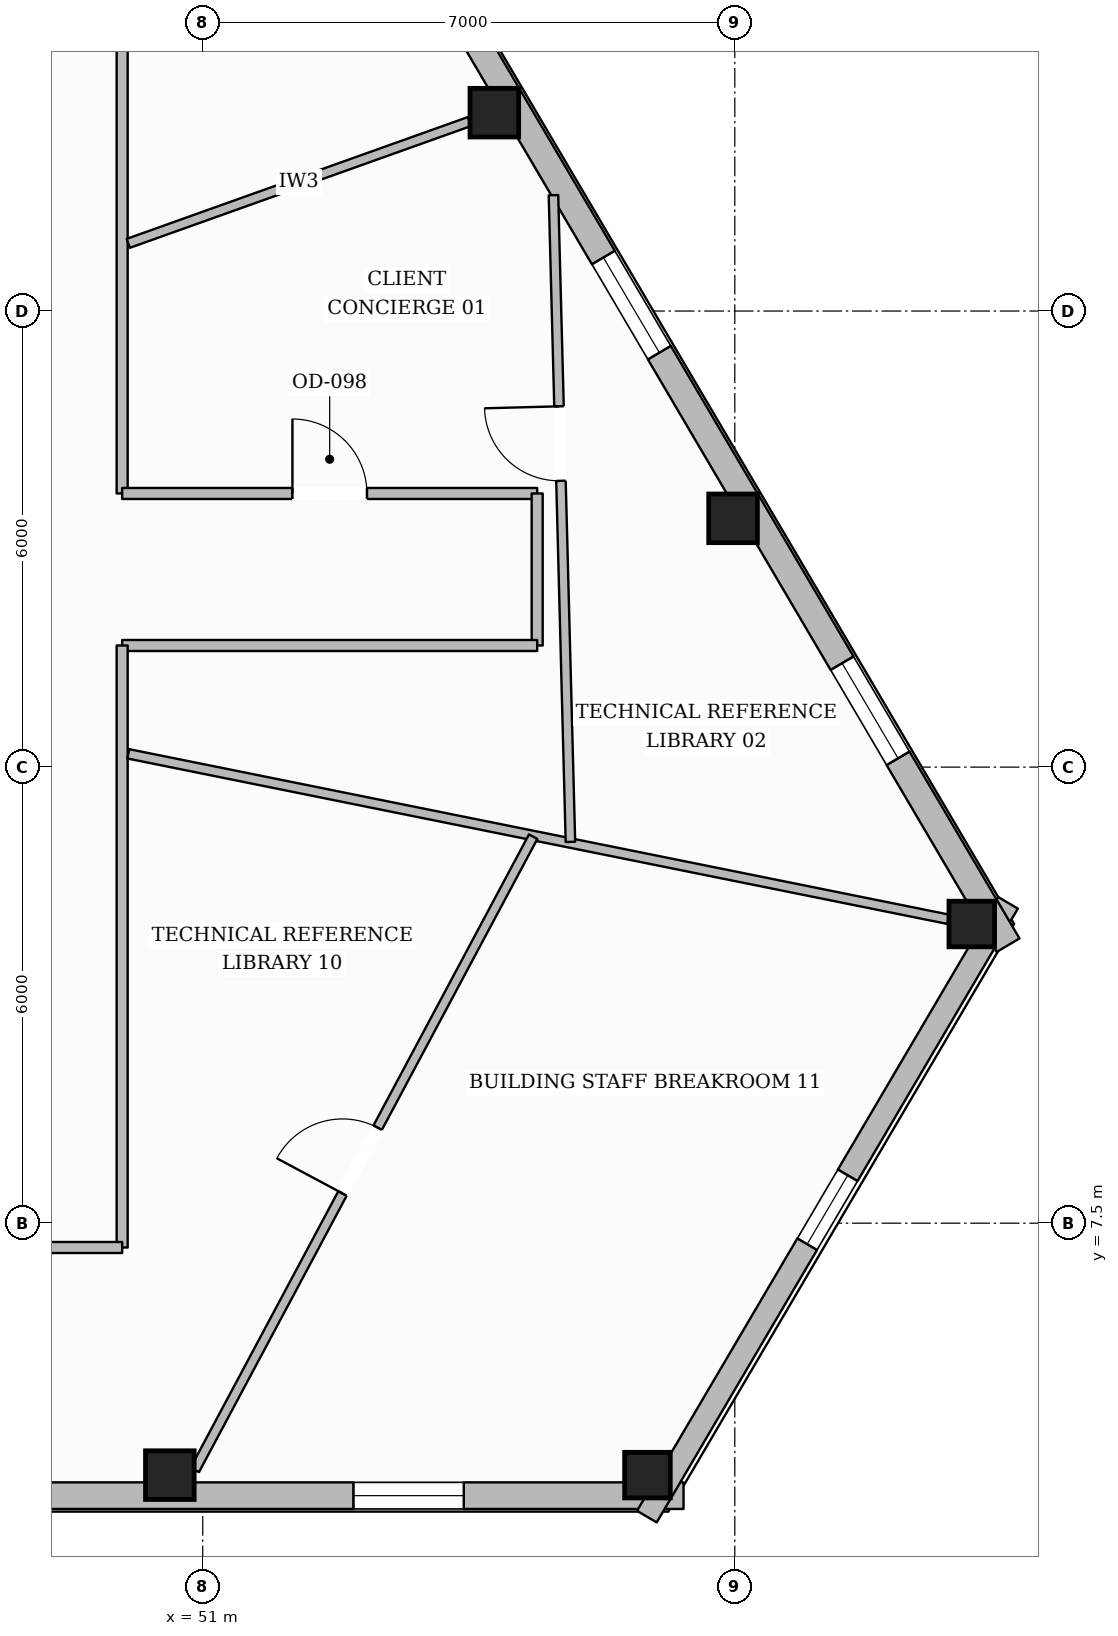
"""IFC4 building model, lengths in metres.
Left out: names, types, materials, properties, quantities, classifications, styles, units other than length and angle.
Written with IfcOpenShell. Run it as: python <this file> out.ifc"""

import sys

from ifc_helpers import new_model, si_unit, direction, frame, frame_2d, origin, origin_2d, place, context, subcontext, project, spatial, rectangle, hollow_rectangle, extrude, element, fill, save


model = new_model("IFC4")
c1 = context("Model", 3, precision=1e-05, world=origin(), true_north=direction((0.0, 1.0)))
c2 = subcontext(c1, "Body", "Model", "MODEL_VIEW")
j1 = project(units=[si_unit("LENGTHUNIT", "METRE"), si_unit("PLANEANGLEUNIT", "RADIAN")], contexts=[c1])
p1 = place(None, origin())
s1 = spatial("IfcSite", under=j1, at=p1, CompositionType="ELEMENT")
p2 = place(p1, origin())
s2 = spatial("IfcBuilding", under=s1, at=p2, CompositionType="ELEMENT")
p3 = place(p2, frame((0.0, 0.0, 203.5)))
s3 = spatial("IfcBuildingStorey", under=s2, at=p3, CompositionType="ELEMENT", Elevation=203.5)
p4 = place(p3, frame((50.567, 4.185, 0.0), z_axis=(0.0, 0.0, 1.0), x_axis=(1.0, 0.0, 0.0)))
e1 = element("IfcColumn", 1, at=p4, inside=s3, PredefinedType="COLUMN", context=c2, shape_type="SweptSolid", body=[
    extrude(hollow_rectangle(XDim=0.64, YDim=0.64, WallThickness=0.028, at=origin_2d()), origin(), (0.0, 0.0, 1.0), 3.6),
])
for number, where, z_axis, x_axis in (
    (2, (56.851, 4.185, 0.0), (0.0, 0.0, 1.0), (1.0, 0.0, 0.0)),
    (3, (61.117, 11.436, 0.0), (0.0, 0.0, 1.0), (1.0, 0.0, 0.0)),
):
    element("IfcColumn", number, at=place(p3, frame(where, z_axis=z_axis, x_axis=x_axis)), inside=s3, PredefinedType="COLUMN", context=c2, shape_type="SweptSolid", body=[
        extrude(hollow_rectangle(XDim=0.6, YDim=0.6, WallThickness=0.028, at=origin_2d()), origin(), (0.0, 0.0, 1.0), 3.6),
    ])
for number, where, z_axis, x_axis in (
    (4, (57.977, 16.773, 0.0), (0.0, 0.0, 1.0), (1.0, 0.0, 0.0)),
    (5, (54.836, 22.11, 0.0), (0.0, 0.0, 1.0), (1.0, 0.0, 0.0)),
):
    element("IfcColumn", number, at=place(p3, frame(where, z_axis=z_axis, x_axis=x_axis)), inside=s3, PredefinedType="COLUMN", context=c2, shape_type="SweptSolid", body=[
        extrude(hollow_rectangle(XDim=0.64, YDim=0.64, WallThickness=0.028, at=origin_2d()), origin(), (0.0, 0.0, 1.0), 3.6),
    ])
p5 = place(p3, frame((57.325, 3.915, 0.0), z_axis=(0.0, 0.0, 1.0), x_axis=(-1.0, 0.0, 0.0)))
e6 = element("IfcWall", 6, at=p5, inside=s3, PredefinedType="STANDARD", context=c2, shape_type="SweptSolid", body=[
    extrude(rectangle(XDim=38.651, YDim=0.35, at=frame_2d((19.325, 0.0))), origin(), (0.0, 0.0, 1.0), 3.132),
])
p6 = place(p5, frame((34.31, 0.0, 0.65)))
e7 = element("IfcOpeningElement", 7, at=p6, cuts=e6, PredefinedType="OPENING", context=c2, shape_type="SweptSolid", body=[
    extrude(rectangle(XDim=1.45, YDim=1.75, at=frame_2d((0.725, 0.875))), frame((0.0, 0.185, 0.0), z_axis=(0.0, -1.0, 0.0), x_axis=(1.0, 0.0, 0.0)), (0.0, 0.0, 1.0), 0.37),
])
p7 = place(p5, frame((28.026, 0.0, 0.65)))
e8 = element("IfcOpeningElement", 8, at=p7, cuts=e6, PredefinedType="OPENING", context=c2, shape_type="SweptSolid", body=[
    extrude(rectangle(XDim=1.45, YDim=1.75, at=frame_2d((0.725, 0.875))), frame((0.0, 0.185, 0.0), z_axis=(0.0, -1.0, 0.0), x_axis=(1.0, 0.0, 0.0)), (0.0, 0.0, 1.0), 0.37),
])
p8 = place(p5, frame((15.458, 0.0, 0.65)))
e9 = element("IfcOpeningElement", 9, at=p8, cuts=e6, PredefinedType="OPENING", context=c2, shape_type="SweptSolid", body=[
    extrude(rectangle(XDim=1.45, YDim=1.75, at=frame_2d((0.725, 0.875))), frame((0.0, 0.185, 0.0), z_axis=(0.0, -1.0, 0.0), x_axis=(1.0, 0.0, 0.0)), (0.0, 0.0, 1.0), 0.37),
])
p9 = place(p5, frame((9.175, 0.0, 0.65)))
e10 = element("IfcOpeningElement", 10, at=p9, cuts=e6, PredefinedType="OPENING", context=c2, shape_type="SweptSolid", body=[
    extrude(rectangle(XDim=1.45, YDim=1.75, at=frame_2d((0.725, 0.875))), frame((0.0, 0.185, 0.0), z_axis=(0.0, -1.0, 0.0), x_axis=(1.0, 0.0, 0.0)), (0.0, 0.0, 1.0), 0.37),
])
p10 = place(p5, frame((2.891, 0.0, 0.65)))
e11 = element("IfcOpeningElement", 11, at=p10, cuts=e6, PredefinedType="OPENING", context=c2, shape_type="SweptSolid", body=[
    extrude(rectangle(XDim=1.45, YDim=1.75, at=frame_2d((0.725, 0.875))), frame((0.0, 0.185, 0.0), z_axis=(0.0, -1.0, 0.0), x_axis=(1.0, 0.0, 0.0)), (0.0, 0.0, 1.0), 0.37),
])
p11 = place(p3, frame((61.595, 11.715, 0.0), z_axis=(0.0, 0.0, 1.0), x_axis=(-0.507146520789, -0.861859853138, 0.0)))
e12 = element("IfcWall", 12, at=p11, inside=s3, PredefinedType="STANDARD", context=c2, shape_type="SweptSolid", body=[
    extrude(rectangle(XDim=9.369, YDim=0.3, at=frame_2d((4.685, 0.0))), origin(), (0.0, 0.0, 1.0), 3.132),
])
p12 = place(p11, frame((4.16, 0.0, 0.65)))
e13 = element("IfcOpeningElement", 13, at=p12, cuts=e12, PredefinedType="OPENING", context=c2, shape_type="SweptSolid", body=[
    extrude(rectangle(XDim=1.05, YDim=1.7, at=frame_2d((0.525, 0.85))), frame((0.0, 0.16, 0.0), z_axis=(0.0, -1.0, 0.0), x_axis=(1.0, 0.0, 0.0)), (0.0, 0.0, 1.0), 0.32),
])
p13 = place(p3, frame((42.267, 44.004, 0.0), z_axis=(0.0, 0.0, 1.0), x_axis=(0.507147779291, -0.861859112593, 0.0)))
e14 = element("IfcWall", 14, at=p13, inside=s3, PredefinedType="STANDARD", context=c2, shape_type="SweptSolid", body=[
    extrude(rectangle(XDim=38.111, YDim=0.35, at=frame_2d((19.056, 0.0))), origin(), (0.0, 0.0, 1.0), 3.132),
])
p14 = place(p13, frame((33.808, 0.0, 0.65)))
e15 = element("IfcOpeningElement", 15, at=p14, cuts=e14, PredefinedType="OPENING", context=c2, shape_type="SweptSolid", body=[
    extrude(rectangle(XDim=1.45, YDim=1.75, at=frame_2d((0.725, 0.875))), frame((0.0, 0.185, 0.0), z_axis=(0.0, -1.0, 0.0), x_axis=(1.0, 0.0, 0.0)), (0.0, 0.0, 1.0), 0.37),
])
p15 = place(p13, frame((27.615, 0.0, 0.65)))
e16 = element("IfcOpeningElement", 16, at=p15, cuts=e14, PredefinedType="OPENING", context=c2, shape_type="SweptSolid", body=[
    extrude(rectangle(XDim=1.45, YDim=1.75, at=frame_2d((0.725, 0.875))), frame((0.0, 0.185, 0.0), z_axis=(0.0, -1.0, 0.0), x_axis=(1.0, 0.0, 0.0)), (0.0, 0.0, 1.0), 0.37),
])
p16 = place(p13, frame((15.231, 0.0, 0.65)))
e17 = element("IfcOpeningElement", 17, at=p16, cuts=e14, PredefinedType="OPENING", context=c2, shape_type="SweptSolid", body=[
    extrude(rectangle(XDim=1.45, YDim=1.75, at=frame_2d((0.725, 0.875))), frame((0.0, 0.185, 0.0), z_axis=(0.0, -1.0, 0.0), x_axis=(1.0, 0.0, 0.0)), (0.0, 0.0, 1.0), 0.37),
])
p17 = place(p13, frame((9.038, 0.0, 0.65)))
e18 = element("IfcOpeningElement", 18, at=p17, cuts=e14, PredefinedType="OPENING", context=c2, shape_type="SweptSolid", body=[
    extrude(rectangle(XDim=1.45, YDim=1.75, at=frame_2d((0.725, 0.875))), frame((0.0, 0.185, 0.0), z_axis=(0.0, -1.0, 0.0), x_axis=(1.0, 0.0, 0.0)), (0.0, 0.0, 1.0), 0.37),
])
p18 = place(p13, frame((2.846, 0.0, 0.65)))
e19 = element("IfcOpeningElement", 19, at=p18, cuts=e14, PredefinedType="OPENING", context=c2, shape_type="SweptSolid", body=[
    extrude(rectangle(XDim=1.45, YDim=1.75, at=frame_2d((0.725, 0.875))), frame((0.0, 0.185, 0.0), z_axis=(0.0, -1.0, 0.0), x_axis=(1.0, 0.0, 0.0)), (0.0, 0.0, 1.0), 0.37),
])
p19 = place(p3, frame((49.94, 25.02, 0.0), z_axis=(0.0, 0.0, 1.0), x_axis=(0.0, -1.0, 0.0)))
e20 = element("IfcWall", 20, at=p19, inside=s3, PredefinedType="PARTITIONING", context=c2, shape_type="SweptSolid", body=[
    extrude(rectangle(XDim=7.92, YDim=0.145, at=frame_2d((3.96, 0.0))), origin(), (0.0, 0.0, 1.0), 3.339),
])
p20 = place(p3, frame((49.94, 17.1, 0.0), z_axis=(0.0, 0.0, 1.0), x_axis=(1.0, 0.0, 0.0)))
e21 = element("IfcWall", 21, at=p20, inside=s3, PredefinedType="PARTITIONING", context=c2, shape_type="SweptSolid", body=[
    extrude(rectangle(XDim=5.46, YDim=0.145, at=frame_2d((2.73, 0.0))), origin(), (0.0, 0.0, 1.0), 3.6),
])
p21 = place(p20, frame((2.24, 0.0, 0.0)))
e22 = element("IfcOpeningElement", 22, at=p21, cuts=e21, PredefinedType="OPENING", context=c2, shape_type="SweptSolid", body=[
    extrude(rectangle(XDim=0.98, YDim=2.15, at=frame_2d((0.49, 1.075))), frame((0.0, 0.083, 0.0), z_axis=(0.0, -1.0, 0.0), x_axis=(1.0, 0.0, 0.0)), (0.0, 0.0, 1.0), 0.165),
])
p22 = place(p3, frame((55.4, 17.1, 0.0), z_axis=(0.0, 0.0, 1.0), x_axis=(0.0, -1.0, 0.0)))
e23 = element("IfcWall", 23, at=p22, inside=s3, PredefinedType="PARTITIONING", context=c2, shape_type="SweptSolid", body=[
    extrude(rectangle(XDim=2.0, YDim=0.145, at=frame_2d((1.0, 0.0))), origin(), (0.0, 0.0, 1.0), 3.339),
])
p23 = place(p3, frame((55.4, 15.1, 0.0), z_axis=(0.0, 0.0, 1.0), x_axis=(-1.0, 0.0, 0.0)))
e24 = element("IfcWall", 24, at=p23, inside=s3, PredefinedType="PARTITIONING", context=c2, shape_type="SweptSolid", body=[
    extrude(rectangle(XDim=5.46, YDim=0.145, at=frame_2d((2.73, 0.0))), origin(), (0.0, 0.0, 1.0), 3.6),
])
p24 = place(p3, frame((49.94, 15.1, 0.0), z_axis=(0.0, 0.0, 1.0), x_axis=(0.0, -1.0, 0.0)))
e25 = element("IfcWall", 25, at=p24, inside=s3, PredefinedType="PARTITIONING", context=c2, shape_type="SweptSolid", body=[
    extrude(rectangle(XDim=7.92, YDim=0.145, at=frame_2d((3.96, 0.0))), origin(), (0.0, 0.0, 1.0), 3.6),
])
p25 = place(p3, frame((49.94, 7.18, 0.0), z_axis=(0.0, 0.0, 1.0), x_axis=(-1.0, 0.0, 0.0)))
e26 = element("IfcWall", 26, at=p25, inside=s3, PredefinedType="PARTITIONING", context=c2, shape_type="SweptSolid", body=[
    extrude(rectangle(XDim=23.88, YDim=0.145, at=frame_2d((11.94, 0.0))), origin(), (0.0, 0.0, 1.0), 3.6),
])
p26 = place(p25, frame((12.995, 0.0, 0.0)))
e27 = element("IfcOpeningElement", 27, at=p26, cuts=e26, PredefinedType="OPENING", context=c2, shape_type="SweptSolid", body=[
    extrude(rectangle(XDim=0.98, YDim=2.15, at=frame_2d((0.49, 1.075))), frame((0.0, 0.083, 0.0), z_axis=(0.0, -1.0, 0.0), x_axis=(1.0, 0.0, 0.0)), (0.0, 0.0, 1.0), 0.165),
])
p27 = place(p25, frame((2.991, 0.0, 0.0)))
e28 = element("IfcOpeningElement", 28, at=p27, cuts=e26, PredefinedType="OPENING", context=c2, shape_type="SweptSolid", body=[
    extrude(rectangle(XDim=0.98, YDim=2.15, at=frame_2d((0.49, 1.075))), frame((0.0, 0.083, 0.0), z_axis=(0.0, -1.0, 0.0), x_axis=(1.0, 0.0, 0.0)), (0.0, 0.0, 1.0), 0.165),
])
p28 = place(p3, frame((50.021, 20.391, 0.0), z_axis=(0.0, 0.0, 1.0), x_axis=(0.941790585993, 0.336200077537, 0.0)))
e29 = element("IfcWall", 29, at=p28, inside=s3, PredefinedType="PARTITIONING", context=c2, shape_type="SweptSolid", body=[
    extrude(rectangle(XDim=4.765, YDim=0.125, at=frame_2d((2.383, 0.0))), origin(), (0.0, 0.0, 1.0), 3.6),
])
p29 = place(p3, frame((50.021, 13.675, 0.0), z_axis=(0.0, 0.0, 1.0), x_axis=(0.980243093282, -0.197796557281, 0.0)))
e30 = element("IfcWall", 30, at=p29, inside=s3, PredefinedType="PARTITIONING", context=c2, shape_type="SweptSolid", body=[
    extrude(rectangle(XDim=11.006, YDim=0.125, at=frame_2d((5.503, 0.0))), origin(), (0.0, 0.0, 1.0), 3.141),
])
p30 = place(p3, frame((55.837, 12.516, 0.0), z_axis=(0.0, 0.0, 1.0), x_axis=(-0.026217670577, 0.999656257795, 0.0)))
e31 = element("IfcWall", 31, at=p30, inside=s3, PredefinedType="PARTITIONING", context=c2, shape_type="SweptSolid", body=[
    extrude(rectangle(XDim=8.511, YDim=0.125, at=frame_2d((4.256, 0.0))), origin(), (0.0, 0.0, 1.0), 3.135),
])
p31 = place(p30, frame((4.752, 0.0, 0.0)))
e32 = element("IfcOpeningElement", 32, at=p31, cuts=e31, PredefinedType="OPENING", context=c2, shape_type="SweptSolid", body=[
    extrude(rectangle(XDim=0.98, YDim=2.15, at=frame_2d((0.49, 1.075))), frame((0.0, 0.073, 0.0), z_axis=(0.0, -1.0, 0.0), x_axis=(1.0, 0.0, 0.0)), (0.0, 0.0, 1.0), 0.145),
])
p32 = place(p3, frame((50.895, 4.254, 0.0), z_axis=(0.0, 0.0, 1.0), x_axis=(0.471344688788, 0.88194908263, 0.0)))
e33 = element("IfcWall", 33, at=p32, inside=s3, PredefinedType="PARTITIONING", context=c2, shape_type="SweptSolid", body=[
    extrude(rectangle(XDim=9.446, YDim=0.125, at=frame_2d((4.723, 0.0))), origin(), (0.0, 0.0, 1.0), 3.339),
])
p33 = place(p32, frame((4.125, 0.0, 0.0)))
e34 = element("IfcOpeningElement", 34, at=p33, cuts=e33, PredefinedType="OPENING", context=c2, shape_type="SweptSolid", body=[
    extrude(rectangle(XDim=0.98, YDim=2.15, at=frame_2d((0.49, 1.075))), frame((0.0, 0.073, 0.0), z_axis=(0.0, -1.0, 0.0), x_axis=(1.0, 0.0, 0.0)), (0.0, 0.0, 1.0), 0.145),
])
p34 = place(p10, origin())
e35 = element("IfcWindow", 35, at=p34, inside=s3, PartitioningType="SINGLE_PANEL", PredefinedType="WINDOW", context=c2, shape_type="SweptSolid", body=[
    extrude(rectangle(XDim=1.45, YDim=1.75, at=frame_2d((0.725, 0.875))), frame((0.0, 0.03, 0.0), z_axis=(0.0, -1.0, 0.0), x_axis=(1.0, 0.0, 0.0)), (0.0, 0.0, 1.0), 0.06),
])
fill(e11, e35)
p35 = place(p14, origin())
e36 = element("IfcWindow", 36, at=p35, inside=s3, PartitioningType="SINGLE_PANEL", PredefinedType="WINDOW", context=c2, shape_type="SweptSolid", body=[
    extrude(rectangle(XDim=1.45, YDim=1.75, at=frame_2d((0.725, 0.875))), frame((0.0, 0.03, 0.0), z_axis=(0.0, -1.0, 0.0), x_axis=(1.0, 0.0, 0.0)), (0.0, 0.0, 1.0), 0.06),
])
fill(e15, e36)
p36 = place(p15, origin())
e37 = element("IfcWindow", 37, at=p36, inside=s3, PartitioningType="SINGLE_PANEL", PredefinedType="WINDOW", context=c2, shape_type="SweptSolid", body=[
    extrude(rectangle(XDim=1.45, YDim=1.75, at=frame_2d((0.725, 0.875))), frame((0.0, 0.03, 0.0), z_axis=(0.0, -1.0, 0.0), x_axis=(1.0, 0.0, 0.0)), (0.0, 0.0, 1.0), 0.06),
])
fill(e16, e37)
p37 = place(p12, origin())
e38 = element("IfcWindow", 38, at=p37, inside=s3, PartitioningType="SINGLE_PANEL", PredefinedType="WINDOW", context=c2, shape_type="SweptSolid", body=[
    extrude(rectangle(XDim=1.05, YDim=1.7, at=frame_2d((0.525, 0.85))), frame((0.0, 0.03, 0.0), z_axis=(0.0, -1.0, 0.0), x_axis=(1.0, 0.0, 0.0)), (0.0, 0.0, 1.0), 0.06),
])
fill(e13, e38)
p38 = place(p21, origin())
e39 = element("IfcDoor", 39, at=p38, inside=s3, OperationType="SINGLE_SWING_LEFT", PredefinedType="DOOR", context=c2, shape_type="SweptSolid", body=[
    extrude(rectangle(XDim=0.98, YDim=2.15, at=frame_2d((0.49, 1.075))), frame((0.0, 0.025, 0.0), z_axis=(0.0, -1.0, 0.0), x_axis=(1.0, 0.0, 0.0)), (0.0, 0.0, 1.0), 0.05),
])
fill(e22, e39)
p39 = place(p31, origin())
e40 = element("IfcDoor", 40, at=p39, inside=s3, OperationType="SINGLE_SWING_RIGHT", PredefinedType="DOOR", context=c2, shape_type="SweptSolid", body=[
    extrude(rectangle(XDim=0.98, YDim=2.15, at=frame_2d((0.49, 1.075))), frame((0.0, 0.025, 0.0), z_axis=(0.0, -1.0, 0.0), x_axis=(1.0, 0.0, 0.0)), (0.0, 0.0, 1.0), 0.05),
])
fill(e32, e40)
p40 = place(p33, origin())
e41 = element("IfcDoor", 41, at=p40, inside=s3, OperationType="SINGLE_SWING_LEFT", PredefinedType="DOOR", context=c2, shape_type="SweptSolid", body=[
    extrude(rectangle(XDim=0.98, YDim=2.15, at=frame_2d((0.49, 1.075))), frame((0.0, 0.025, 0.0), z_axis=(0.0, -1.0, 0.0), x_axis=(1.0, 0.0, 0.0)), (0.0, 0.0, 1.0), 0.05),
])
fill(e34, e41)
save(model, sys.argv[1])
